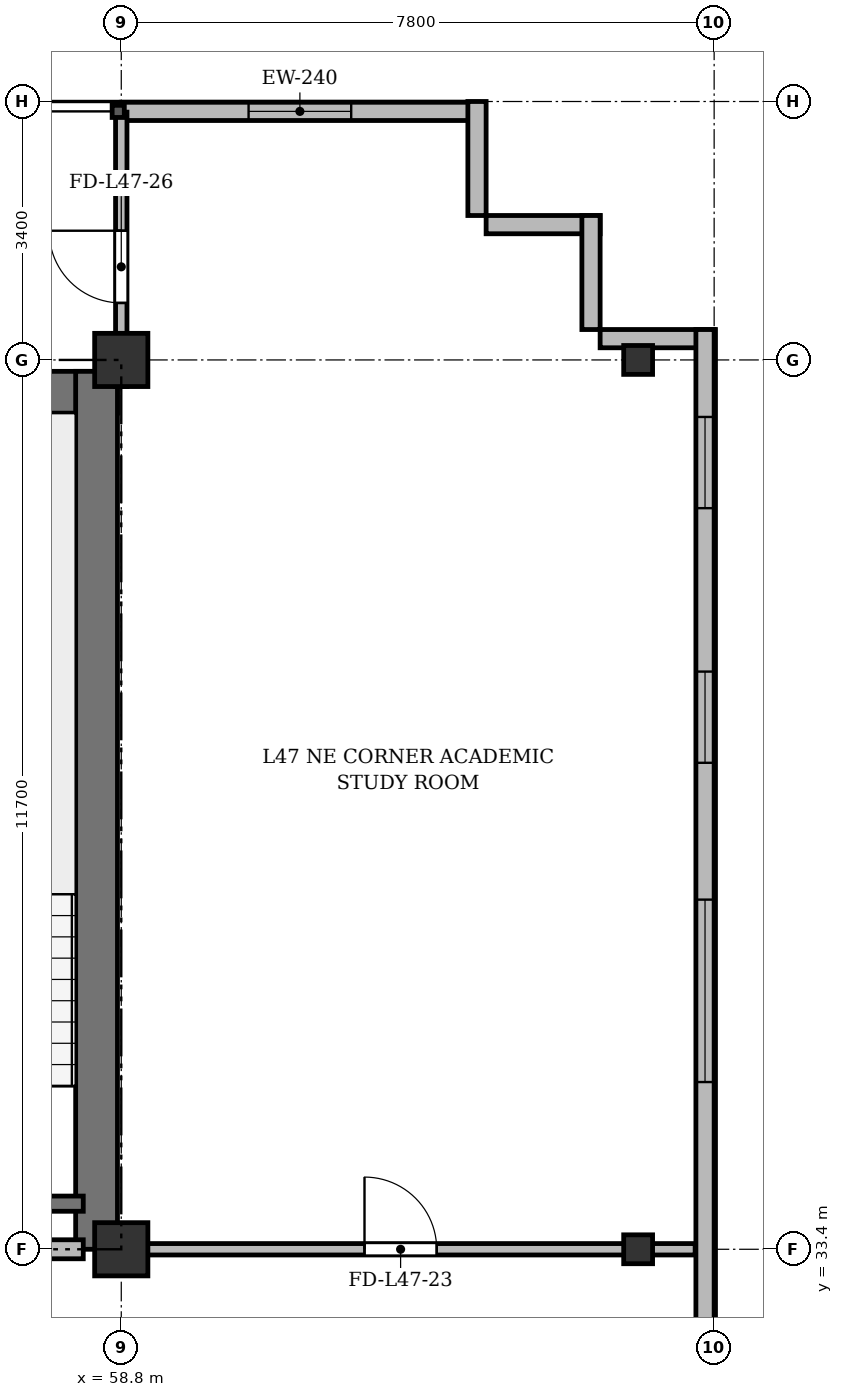
"""IFC4 building model, lengths in metres.
Left out: names, types, materials, properties, quantities, classifications, styles, units other than length and angle.
Written with IfcOpenShell. Run it as: python <this file> out.ifc"""

import sys

from ifc_helpers import new_model, si_unit, direction, frame, frame_2d, origin, origin_2d, place, context, subcontext, project, spatial, rectangle, i_section, extrude, source, transform, mapped, element, fill, save


model = new_model("IFC4")
c1 = context("Model", 3, precision=1e-05, world=origin(), true_north=direction((0.0, 1.0)))
c2 = subcontext(c1, "Body", "Model", "MODEL_VIEW")
j1 = project(units=[si_unit("LENGTHUNIT", "METRE"), si_unit("PLANEANGLEUNIT", "RADIAN")], contexts=[c1])
p1 = place(None, origin())
s1 = spatial("IfcSite", under=j1, at=p1, CompositionType="ELEMENT")
p2 = place(p1, origin())
s2 = spatial("IfcBuilding", under=s1, at=p2, CompositionType="ELEMENT")
p3 = place(p2, frame((0.0, 0.0, 178.9)))
s3 = spatial("IfcBuildingStorey", under=s2, at=p3, CompositionType="ELEMENT", Elevation=178.9)
m1 = source(origin(), c2, "Body", "SweptSolid", [
    extrude(rectangle(XDim=0.7, YDim=0.7, at=origin_2d()), origin(), (0.0, 0.0, 1.0), 3.6),
])
for number, where, z_axis, x_axis in (
    (1, (58.8, 33.4, 0.0), (0.0, 0.0, 1.0), (1.0, 0.0, 0.0)),
    (2, (58.8, 45.1, 0.0), (0.0, 0.0, 1.0), (1.0, 0.0, 0.0)),
):
    element("IfcColumn", number, at=place(p3, frame(where, z_axis=z_axis, x_axis=x_axis)), inside=s3, PredefinedType="COLUMN", context=c2, shape_type="MappedRepresentation", body=[
        mapped(m1, transform((0.0, 0.0, 0.0), x_axis=(1.0, 0.0, 0.0), y_axis=(0.0, 1.0, 0.0), z_axis=(0.0, 0.0, 1.0), scale=1.0)),
    ])
m2 = source(origin(), c2, "Body", "SweptSolid", [
    extrude(i_section(OverallWidth=0.38, OverallDepth=0.38, WebThickness=0.02, FlangeThickness=0.03, at=origin_2d()), origin(), (0.0, 0.0, 1.0), 3.6),
])
for number, where, z_axis, x_axis in (
    (3, (65.6, 33.4, 0.0), (0.0, 0.0, 1.0), (1.0, 0.0, 0.0)),
    (4, (65.6, 45.1, 0.0), (0.0, 0.0, 1.0), (1.0, 0.0, 0.0)),
):
    element("IfcColumn", number, at=place(p3, frame(where, z_axis=z_axis, x_axis=x_axis)), inside=s3, PredefinedType="COLUMN", context=c2, shape_type="MappedRepresentation", body=[
        mapped(m2, transform((0.0, 0.0, 0.0), x_axis=(1.0, 0.0, 0.0), y_axis=(0.0, 1.0, 0.0), z_axis=(0.0, 0.0, 1.0), scale=1.0)),
    ])
p4 = place(p3, frame((58.8, 48.37, 0.0), z_axis=(0.0, 0.0, 1.0), x_axis=(1.0, 0.0, 0.0)))
e5 = element("IfcWall", 5, at=p4, inside=s3, PredefinedType="SOLIDWALL", context=c2, shape_type="SweptSolid", body=[
    extrude(rectangle(XDim=4.7, YDim=0.24, at=frame_2d((2.35, 0.0))), origin(), (0.0, 0.0, 1.0), 3.22),
])
p5 = place(p4, frame((1.675, 0.0, 0.9)))
e6 = element("IfcOpeningElement", 6, at=p5, cuts=e5, PredefinedType="OPENING", context=c2, shape_type="SweptSolid", body=[
    extrude(rectangle(XDim=1.35, YDim=1.5, at=frame_2d((0.675, 0.75))), frame((0.0, 0.13, 0.0), z_axis=(0.0, -1.0, 0.0), x_axis=(1.0, 0.0, 0.0)), (0.0, 0.0, 1.0), 0.26),
])
for number, where, z_axis, x_axis in (
    (7, (63.48, 48.5, 0.0), (0.0, 0.0, 1.0), (0.0, -1.0, 0.0)),
    (8, (63.6, 46.88, 0.0), (0.0, 0.0, 1.0), (1.0, 0.0, 0.0)),
    (9, (64.98, 47.0, 0.0), (0.0, 0.0, 1.0), (0.0, -1.0, 0.0)),
    (10, (65.1, 45.38, 0.0), (0.0, 0.0, 1.0), (1.0, 0.0, 0.0)),
):
    element("IfcWall", number, at=place(p3, frame(where, z_axis=z_axis, x_axis=x_axis)), inside=s3, PredefinedType="SOLIDWALL", context=c2, shape_type="SweptSolid", body=[
        extrude(rectangle(XDim=1.5, YDim=0.24, at=frame_2d((0.75, 0.0))), origin(), (0.0, 0.0, 1.0), 3.22),
    ])
p6 = place(p3, frame((66.48, 45.5, 0.0), z_axis=(0.0, 0.0, 1.0), x_axis=(0.0, -1.0, 0.0)))
e11 = element("IfcWall", 11, at=p6, inside=s3, PredefinedType="SOLIDWALL", context=c2, shape_type="SweptSolid", body=[
    extrude(rectangle(XDim=39.2, YDim=0.24, at=frame_2d((19.6, 0.0))), origin(), (0.0, 0.0, 1.0), 3.22),
])
p7 = place(p6, frame((36.55, 0.0, 0.92)))
e12 = element("IfcOpeningElement", 12, at=p7, cuts=e11, PredefinedType="OPENING", context=c2, shape_type="SweptSolid", body=[
    extrude(rectangle(XDim=1.2, YDim=1.65, at=frame_2d((0.6, 0.825))), frame((0.0, 0.13, 0.0), z_axis=(0.0, -1.0, 0.0), x_axis=(1.0, 0.0, 0.0)), (0.0, 0.0, 1.0), 0.26),
])
p8 = place(p6, frame((32.9, 0.0, 0.92)))
e13 = element("IfcOpeningElement", 13, at=p8, cuts=e11, PredefinedType="OPENING", context=c2, shape_type="SweptSolid", body=[
    extrude(rectangle(XDim=2.4, YDim=2.1, at=frame_2d((1.2, 1.05))), frame((0.0, 0.13, 0.0), z_axis=(0.0, -1.0, 0.0), x_axis=(1.0, 0.0, 0.0)), (0.0, 0.0, 1.0), 0.26),
])
p9 = place(p6, frame((28.7, 0.0, 0.92)))
e14 = element("IfcOpeningElement", 14, at=p9, cuts=e11, PredefinedType="OPENING", context=c2, shape_type="SweptSolid", body=[
    extrude(rectangle(XDim=2.4, YDim=2.1, at=frame_2d((1.2, 1.05))), frame((0.0, 0.13, 0.0), z_axis=(0.0, -1.0, 0.0), x_axis=(1.0, 0.0, 0.0)), (0.0, 0.0, 1.0), 0.26),
])
p10 = place(p6, frame((21.5, 0.0, 0.92)))
e15 = element("IfcOpeningElement", 15, at=p10, cuts=e11, PredefinedType="OPENING", context=c2, shape_type="SweptSolid", body=[
    extrude(rectangle(XDim=2.4, YDim=2.1, at=frame_2d((1.2, 1.05))), frame((0.0, 0.13, 0.0), z_axis=(0.0, -1.0, 0.0), x_axis=(1.0, 0.0, 0.0)), (0.0, 0.0, 1.0), 0.26),
])
p11 = place(p6, frame((7.5, 0.0, 0.92)))
e16 = element("IfcOpeningElement", 16, at=p11, cuts=e11, PredefinedType="OPENING", context=c2, shape_type="SweptSolid", body=[
    extrude(rectangle(XDim=2.4, YDim=2.1, at=frame_2d((1.2, 1.05))), frame((0.0, 0.13, 0.0), z_axis=(0.0, -1.0, 0.0), x_axis=(1.0, 0.0, 0.0)), (0.0, 0.0, 1.0), 0.26),
])
p12 = place(p6, frame((4.5, 0.0, 0.92)))
e17 = element("IfcOpeningElement", 17, at=p12, cuts=e11, PredefinedType="OPENING", context=c2, shape_type="SweptSolid", body=[
    extrude(rectangle(XDim=1.2, YDim=1.65, at=frame_2d((0.6, 0.825))), frame((0.0, 0.13, 0.0), z_axis=(0.0, -1.0, 0.0), x_axis=(1.0, 0.0, 0.0)), (0.0, 0.0, 1.0), 0.26),
])
p13 = place(p6, frame((1.15, 0.0, 0.92)))
e18 = element("IfcOpeningElement", 18, at=p13, cuts=e11, PredefinedType="OPENING", context=c2, shape_type="SweptSolid", body=[
    extrude(rectangle(XDim=1.2, YDim=1.65, at=frame_2d((0.6, 0.825))), frame((0.0, 0.13, 0.0), z_axis=(0.0, -1.0, 0.0), x_axis=(1.0, 0.0, 0.0)), (0.0, 0.0, 1.0), 0.26),
])
p14 = place(p3, frame((15.65, 44.675, 0.0), z_axis=(0.0, 0.0, 1.0), x_axis=(1.0, 0.0, 0.0)))
e19 = element("IfcWall", 19, at=p14, inside=s3, PredefinedType="SHEAR", context=c2, shape_type="SweptSolid", body=[
    extrude(rectangle(XDim=43.1, YDim=0.55, at=frame_2d((21.55, 0.0))), origin(), (0.0, 0.0, 1.0), 3.22),
])
p15 = place(p3, frame((58.475, 33.4, 0.0), z_axis=(0.0, 0.0, 1.0), x_axis=(0.0, 1.0, 0.0)))
e20 = element("IfcWall", 20, at=p15, inside=s3, PredefinedType="SHEAR", context=c2, shape_type="SweptSolid", body=[
    extrude(rectangle(XDim=11.55, YDim=0.55, at=frame_2d((5.775, 0.0))), origin(), (0.0, 0.0, 1.0), 3.22),
])
p16 = place(p3, frame((54.9, 34.0, 0.0), z_axis=(0.0, 0.0, 1.0), x_axis=(1.0, 0.0, 0.0)))
e21 = element("IfcWall", 21, at=p16, inside=s3, PredefinedType="SHEAR", context=c2, shape_type="SweptSolid", body=[
    extrude(rectangle(XDim=3.4, YDim=0.2, at=frame_2d((1.7, 0.0))), origin(), (0.0, 0.0, 1.0), 3.22),
])
p17 = place(p3, frame((47.15, 33.4, 0.0), z_axis=(0.0, 0.0, 1.0), x_axis=(1.0, 0.0, 0.0)))
e22 = element("IfcWall", 22, at=p17, inside=s3, PredefinedType="PARTITIONING", context=c2, shape_type="SweptSolid", body=[
    extrude(rectangle(XDim=11.15, YDim=0.25, at=frame_2d((5.575, 0.0))), origin(), (0.0, 0.0, 1.0), 2.62),
])
p18 = place(p17, frame((0.7, 0.0, 0.0)))
e23 = element("IfcOpeningElement", 23, at=p18, cuts=e22, PredefinedType="OPENING", context=c2, shape_type="SweptSolid", body=[
    extrude(rectangle(XDim=0.95, YDim=2.15, at=frame_2d((0.475, 1.075))), frame((0.0, 0.135, 0.0), z_axis=(0.0, -1.0, 0.0), x_axis=(1.0, 0.0, 0.0)), (0.0, 0.0, 1.0), 0.27),
])
p19 = place(p17, frame((6.0, 0.0, 0.0)))
e24 = element("IfcOpeningElement", 24, at=p19, cuts=e22, PredefinedType="OPENING", context=c2, shape_type="SweptSolid", body=[
    extrude(rectangle(XDim=1.2, YDim=2.15, at=frame_2d((0.6, 1.075))), frame((0.0, 0.135, 0.0), z_axis=(0.0, -1.0, 0.0), x_axis=(1.0, 0.0, 0.0)), (0.0, 0.0, 1.0), 0.27),
])
p20 = place(p3, frame((58.8, 33.4, 0.0), z_axis=(0.0, 0.0, 1.0), x_axis=(1.0, 0.0, 0.0)))
e25 = element("IfcWall", 25, at=p20, inside=s3, PredefinedType="PARTITIONING", context=c2, shape_type="SweptSolid", body=[
    extrude(rectangle(XDim=7.55, YDim=0.15, at=frame_2d((3.775, 0.0))), origin(), (0.0, 0.0, 1.0), 2.62),
])
p21 = place(p20, frame((3.2, 0.0, 0.0)))
e26 = element("IfcOpeningElement", 26, at=p21, cuts=e25, PredefinedType="OPENING", context=c2, shape_type="SweptSolid", body=[
    extrude(rectangle(XDim=0.95, YDim=2.15, at=frame_2d((0.475, 1.075))), frame((0.0, 0.085, 0.0), z_axis=(0.0, -1.0, 0.0), x_axis=(1.0, 0.0, 0.0)), (0.0, 0.0, 1.0), 0.17),
])
p22 = place(p3, frame((58.8, 44.75, 0.0), z_axis=(0.0, 0.0, 1.0), x_axis=(0.0, 1.0, 0.0)))
e27 = element("IfcWall", 27, at=p22, inside=s3, PredefinedType="PARTITIONING", context=c2, shape_type="SweptSolid", body=[
    extrude(rectangle(XDim=3.61, YDim=0.15, at=frame_2d((1.805, 0.0))), origin(), (0.0, 0.0, 1.0), 2.72),
])
p23 = place(p22, frame((1.1, 0.0, 0.0)))
e28 = element("IfcOpeningElement", 28, at=p23, cuts=e27, PredefinedType="OPENING", context=c2, shape_type="SweptSolid", body=[
    extrude(rectangle(XDim=0.95, YDim=2.15, at=frame_2d((0.475, 1.075))), frame((0.0, 0.085, 0.0), z_axis=(0.0, -1.0, 0.0), x_axis=(1.0, 0.0, 0.0)), (0.0, 0.0, 1.0), 0.17),
])
m3 = source(origin(), c2, "Body", "SweptSolid", [
    extrude(rectangle(XDim=1.35, YDim=1.5, at=frame_2d((0.675, 0.75))), frame((0.0, 0.03, 0.0), z_axis=(0.0, -1.0, 0.0), x_axis=(1.0, 0.0, 0.0)), (0.0, 0.0, 1.0), 0.06),
])
p24 = place(p5, origin())
e29 = element("IfcWindow", 29, at=p24, inside=s3, PartitioningType="SINGLE_PANEL", PredefinedType="WINDOW", context=c2, shape_type="MappedRepresentation", body=[
    mapped(m3, transform((0.0, 0.0, 0.0), x_axis=(1.0, 0.0, 0.0), y_axis=(0.0, 1.0, 0.0), z_axis=(0.0, 0.0, 1.0), scale=1.0)),
])
fill(e6, e29)
m4 = source(origin(), c2, "Body", "SweptSolid", [
    extrude(rectangle(XDim=2.4, YDim=2.1, at=frame_2d((1.2, 1.05))), frame((0.0, 0.03, 0.0), z_axis=(0.0, -1.0, 0.0), x_axis=(1.0, 0.0, 0.0)), (0.0, 0.0, 1.0), 0.06),
])
p25 = place(p11, origin())
e30 = element("IfcWindow", 30, at=p25, inside=s3, PartitioningType="SINGLE_PANEL", PredefinedType="WINDOW", context=c2, shape_type="MappedRepresentation", body=[
    mapped(m4, transform((0.0, 0.0, 0.0), x_axis=(1.0, 0.0, 0.0), y_axis=(0.0, 1.0, 0.0), z_axis=(0.0, 0.0, 1.0), scale=1.0)),
])
fill(e16, e30)
m5 = source(origin(), c2, "Body", "SweptSolid", [
    extrude(rectangle(XDim=1.2, YDim=1.65, at=frame_2d((0.6, 0.825))), frame((0.0, 0.03, 0.0), z_axis=(0.0, -1.0, 0.0), x_axis=(1.0, 0.0, 0.0)), (0.0, 0.0, 1.0), 0.06),
])
p26 = place(p12, origin())
e31 = element("IfcWindow", 31, at=p26, inside=s3, PartitioningType="SINGLE_PANEL", PredefinedType="WINDOW", context=c2, shape_type="MappedRepresentation", body=[
    mapped(m5, transform((0.0, 0.0, 0.0), x_axis=(1.0, 0.0, 0.0), y_axis=(0.0, 1.0, 0.0), z_axis=(0.0, 0.0, 1.0), scale=1.0)),
])
fill(e17, e31)
p27 = place(p13, origin())
e32 = element("IfcWindow", 32, at=p27, inside=s3, PartitioningType="SINGLE_PANEL", PredefinedType="WINDOW", context=c2, shape_type="MappedRepresentation", body=[
    mapped(m5, transform((0.0, 0.0, 0.0), x_axis=(1.0, 0.0, 0.0), y_axis=(0.0, 1.0, 0.0), z_axis=(0.0, 0.0, 1.0), scale=1.0)),
])
fill(e18, e32)
m6 = source(origin(), c2, "Body", "SweptSolid", [
    extrude(rectangle(XDim=0.95, YDim=2.15, at=frame_2d((0.475, 1.075))), frame((0.0, 0.025, 0.0), z_axis=(0.0, -1.0, 0.0), x_axis=(1.0, 0.0, 0.0)), (0.0, 0.0, 1.0), 0.05),
])
p28 = place(p21, origin())
e33 = element("IfcDoor", 33, at=p28, inside=s3, OperationType="SINGLE_SWING_LEFT", PredefinedType="DOOR", context=c2, shape_type="MappedRepresentation", body=[
    mapped(m6, transform((0.0, 0.0, 0.0), x_axis=(1.0, 0.0, 0.0), y_axis=(0.0, 1.0, 0.0), z_axis=(0.0, 0.0, 1.0), scale=1.0)),
])
fill(e26, e33)
p29 = place(p23, origin())
e34 = element("IfcDoor", 34, at=p29, inside=s3, OperationType="SINGLE_SWING_RIGHT", PredefinedType="DOOR", context=c2, shape_type="MappedRepresentation", body=[
    mapped(m6, transform((0.0, 0.0, 0.0), x_axis=(1.0, 0.0, 0.0), y_axis=(0.0, 1.0, 0.0), z_axis=(0.0, 0.0, 1.0), scale=1.0)),
])
fill(e28, e34)
save(model, sys.argv[1])
